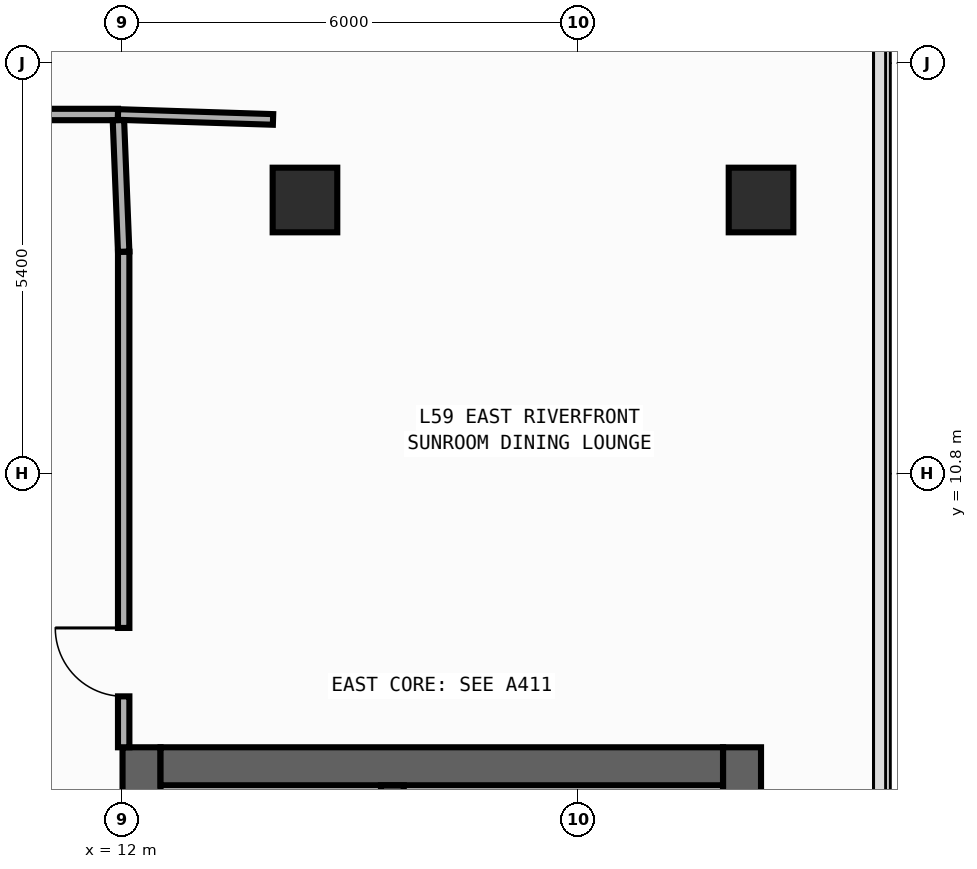
"""IFC4 building model, lengths in metres.
Left out: names, types, materials, properties, quantities, classifications, styles, units other than length and angle.
Written with IfcOpenShell. Run it as: python <this file> out.ifc"""

import sys

from ifc_helpers import new_model, si_unit, direction, frame, frame_2d, origin, origin_2d, place, context, subcontext, project, spatial, rectangle, extrude, element, fill, save


model = new_model("IFC4")
c1 = context("Model", 3, precision=1e-05, world=origin(), true_north=direction((0.0, 1.0)))
c2 = subcontext(c1, "Body", "Model", "MODEL_VIEW")
j1 = project(units=[si_unit("LENGTHUNIT", "METRE"), si_unit("PLANEANGLEUNIT", "RADIAN")], contexts=[c1])
p1 = place(None, origin())
s1 = spatial("IfcSite", under=j1, at=p1, CompositionType="ELEMENT")
p2 = place(p1, origin())
s2 = spatial("IfcBuilding", under=s1, at=p2, CompositionType="ELEMENT")
p3 = place(p2, frame((0.0, 0.0, 251.2)))
s3 = spatial("IfcBuildingStorey", under=s2, at=p3, CompositionType="ELEMENT", Elevation=251.2)
p4 = place(p3, frame((12.25, -19.8, 0.0), z_axis=(0.0, 0.0, 1.0), x_axis=(0.0, 1.0, 0.0)))
e1 = element("IfcWall", 1, at=p4, inside=s3, PredefinedType="SHEAR", context=c2, shape_type="SweptSolid", body=[
    extrude(rectangle(XDim=27.0, YDim=0.5, at=frame_2d((13.5, 0.0))), origin(), (0.0, 0.0, 1.0), 3.34),
])
p5 = place(p4, frame((23.05, 0.0, 0.0)))
e2 = element("IfcOpeningElement", 2, at=p5, cuts=e1, PredefinedType="OPENING", context=c2, shape_type="SweptSolid", body=[
    extrude(rectangle(XDim=1.1, YDim=2.2, at=frame_2d((0.55, 1.1))), frame((0.0, 0.26, 0.0), z_axis=(0.0, -1.0, 0.0), x_axis=(1.0, 0.0, 0.0)), (0.0, 0.0, 1.0), 0.52),
])
p6 = place(p4, frame((19.85, 0.0, 0.0)))
e3 = element("IfcOpeningElement", 3, at=p6, cuts=e1, PredefinedType="OPENING", context=c2, shape_type="SweptSolid", body=[
    extrude(rectangle(XDim=1.1, YDim=2.2, at=frame_2d((0.55, 1.1))), frame((0.0, 0.26, 0.0), z_axis=(0.0, -1.0, 0.0), x_axis=(1.0, 0.0, 0.0)), (0.0, 0.0, 1.0), 0.52),
])
p7 = place(p4, frame((16.65, 0.0, 0.0)))
e4 = element("IfcOpeningElement", 4, at=p7, cuts=e1, PredefinedType="OPENING", context=c2, shape_type="SweptSolid", body=[
    extrude(rectangle(XDim=1.1, YDim=2.2, at=frame_2d((0.55, 1.1))), frame((0.0, 0.26, 0.0), z_axis=(0.0, -1.0, 0.0), x_axis=(1.0, 0.0, 0.0)), (0.0, 0.0, 1.0), 0.52),
])
p8 = place(p4, frame((10.175, 0.0, 0.0)))
e5 = element("IfcOpeningElement", 5, at=p8, cuts=e1, PredefinedType="OPENING", context=c2, shape_type="SweptSolid", body=[
    extrude(rectangle(XDim=0.85, YDim=2.1, at=frame_2d((0.425, 1.05))), frame((0.0, 0.26, 0.0), z_axis=(0.0, -1.0, 0.0), x_axis=(1.0, 0.0, 0.0)), (0.0, 0.0, 1.0), 0.52),
])
p9 = place(p4, frame((12.725, 0.0, 0.0)))
e6 = element("IfcOpeningElement", 6, at=p9, cuts=e1, PredefinedType="OPENING", context=c2, shape_type="SweptSolid", body=[
    extrude(rectangle(XDim=1.15, YDim=2.2, at=frame_2d((0.575, 1.1))), frame((0.0, 0.26, 0.0), z_axis=(0.0, -1.0, 0.0), x_axis=(1.0, 0.0, 0.0)), (0.0, 0.0, 1.0), 0.52),
])
p10 = place(p4, frame((25.125, 0.0, 0.0)))
e7 = element("IfcOpeningElement", 7, at=p10, cuts=e1, PredefinedType="OPENING", context=c2, shape_type="SweptSolid", body=[
    extrude(rectangle(XDim=0.85, YDim=2.1, at=frame_2d((0.425, 1.05))), frame((0.0, 0.26, 0.0), z_axis=(0.0, -1.0, 0.0), x_axis=(1.0, 0.0, 0.0)), (0.0, 0.0, 1.0), 0.52),
])
p11 = place(p3, frame((20.15, -19.8, 0.0), z_axis=(0.0, 0.0, 1.0), x_axis=(0.0, 1.0, 0.0)))
e8 = element("IfcWall", 8, at=p11, inside=s3, PredefinedType="SHEAR", context=c2, shape_type="SweptSolid", body=[
    extrude(rectangle(XDim=27.0, YDim=0.5, at=frame_2d((13.5, 0.0))), origin(), (0.0, 0.0, 1.0), 3.34),
])
p12 = place(p3, frame((12.5, 6.95, 0.0), z_axis=(0.0, 0.0, 1.0), x_axis=(1.0, 0.0, 0.0)))
e9 = element("IfcWall", 9, at=p12, inside=s3, PredefinedType="SHEAR", context=c2, shape_type="SweptSolid", body=[
    extrude(rectangle(XDim=7.4, YDim=0.5, at=frame_2d((3.7, 0.0))), origin(), (0.0, 0.0, 1.0), 3.34),
])
p13 = place(p3, frame((15.55, -19.3, 0.0), z_axis=(0.0, 0.0, 1.0), x_axis=(0.0, 1.0, 0.0)))
e10 = element("IfcWall", 10, at=p13, inside=s3, PredefinedType="SHEAR", context=c2, shape_type="SweptSolid", body=[
    extrude(rectangle(XDim=26.0, YDim=0.3, at=frame_2d((13.0, 0.0))), origin(), (0.0, 0.0, 1.0), 3.34),
])
p14 = place(p13, frame((12.225, 0.0, 0.0)))
e11 = element("IfcOpeningElement", 11, at=p14, cuts=e10, PredefinedType="OPENING", context=c2, shape_type="SweptSolid", body=[
    extrude(rectangle(XDim=1.15, YDim=2.2, at=frame_2d((0.575, 1.1))), frame((0.0, 0.16, 0.0), z_axis=(0.0, -1.0, 0.0), x_axis=(1.0, 0.0, 0.0)), (0.0, 0.0, 1.0), 0.32),
])
p15 = place(p13, frame((24.625, 0.0, 0.0)))
e12 = element("IfcOpeningElement", 12, at=p15, cuts=e10, PredefinedType="OPENING", context=c2, shape_type="SweptSolid", body=[
    extrude(rectangle(XDim=0.85, YDim=2.1, at=frame_2d((0.425, 1.05))), frame((0.0, 0.16, 0.0), z_axis=(0.0, -1.0, 0.0), x_axis=(1.0, 0.0, 0.0)), (0.0, 0.0, 1.0), 0.32),
])
for number, where, z_axis, x_axis in (
    (13, (20.4, 14.4, 0.0), (0.0, 0.0, 1.0), (1.0, 0.0, 0.0)),
    (14, (14.4, 14.4, 0.0), (0.0, 0.0, 1.0), (1.0, 0.0, 0.0)),
):
    element("IfcColumn", number, at=place(p3, frame(where, z_axis=z_axis, x_axis=x_axis)), inside=s3, PredefinedType="COLUMN", context=c2, shape_type="SweptSolid", body=[
        extrude(rectangle(XDim=0.85, YDim=0.85, at=origin_2d()), origin(), (0.0, 0.0, 1.0), 3.6),
    ])
p16 = place(p3, frame((12.015, 7.2, 0.0), z_axis=(0.0, 0.0, 1.0), x_axis=(0.0, 1.0, 0.0)))
e15 = element("IfcWall", 15, at=p16, inside=s3, PredefinedType="PARTITIONING", context=c2, shape_type="SweptSolid", body=[
    extrude(rectangle(XDim=6.52, YDim=0.15, at=frame_2d((3.26, 0.0))), origin(), (0.0, 0.0, 1.0), 3.34),
])
p17 = place(p16, frame((0.67, 0.0, 0.0)))
e16 = element("IfcOpeningElement", 16, at=p17, cuts=e15, PredefinedType="OPENING", context=c2, shape_type="SweptSolid", body=[
    extrude(rectangle(XDim=0.9, YDim=2.15, at=frame_2d((0.45, 1.075))), frame((0.0, 0.085, 0.0), z_axis=(0.0, -1.0, 0.0), x_axis=(1.0, 0.0, 0.0)), (0.0, 0.0, 1.0), 0.17),
])
p18 = place(p3, frame((9.86, 15.525, 0.0), z_axis=(0.0, 0.0, 1.0), x_axis=(1.0, 0.0, 0.0)))
e17 = element("IfcWall", 17, at=p18, inside=s3, PredefinedType="PARTITIONING", context=c2, shape_type="SweptSolid", body=[
    extrude(rectangle(XDim=2.08, YDim=0.15, at=frame_2d((1.04, 0.0))), origin(), (0.0, 0.0, 1.0), 3.34),
])
p19 = place(p3, frame((12.015, 13.72, 0.0), z_axis=(0.0, 0.0, 1.0), x_axis=(-0.040046877756, 0.99919780203, 0.0)))
e18 = element("IfcWall", 18, at=p19, inside=s3, PredefinedType="PARTITIONING", context=c2, shape_type="SweptSolid", body=[
    extrude(rectangle(XDim=1.731, YDim=0.15, at=frame_2d((0.866, 0.0))), origin(), (0.0, 0.0, 1.0), 3.34),
])
p20 = place(p3, frame((11.94, 15.525, 0.0), z_axis=(0.0, 0.0, 1.0), x_axis=(0.999493701671, -0.031817295912, 0.0)))
e19 = element("IfcWall", 19, at=p20, inside=s3, PredefinedType="PARTITIONING", context=c2, shape_type="SweptSolid", body=[
    extrude(rectangle(XDim=2.041, YDim=0.14, at=frame_2d((1.021, 0.0))), origin(), (0.0, 0.0, 1.0), 3.34),
])
p21 = place(p17, origin())
e20 = element("IfcDoor", 20, at=p21, inside=s3, OperationType="SINGLE_SWING_RIGHT", PredefinedType="DOOR", context=c2, shape_type="SweptSolid", body=[
    extrude(rectangle(XDim=0.9, YDim=2.15, at=frame_2d((0.45, 1.075))), frame((0.0, 0.025, 0.0), z_axis=(0.0, -1.0, 0.0), x_axis=(1.0, 0.0, 0.0)), (0.0, 0.0, 1.0), 0.05),
])
fill(e16, e20)
save(model, sys.argv[1])
